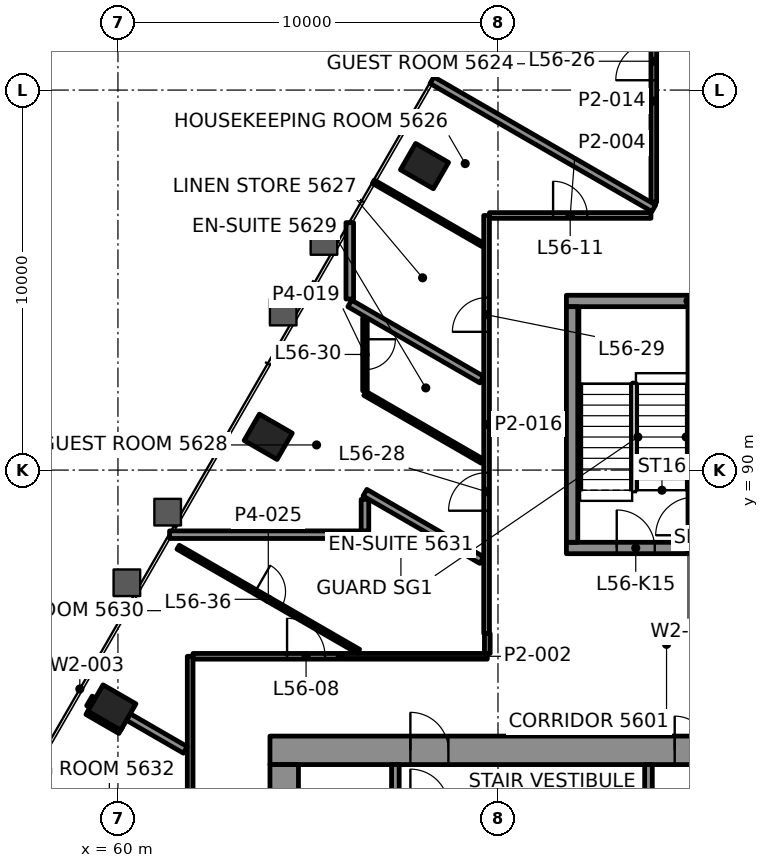
"""IFC4 building model, lengths in metres.
Left out: names, types, materials, properties, quantities, classifications, styles, units other than length and angle.
Written with IfcOpenShell. Run it as: python <this file> out.ifc"""

import sys

from ifc_helpers import new_model, si_unit, direction, frame, frame_2d, origin, origin_2d, place, context, subcontext, project, spatial, rectangle, hollow_rectangle, extrude, element, fill, save


model = new_model("IFC4")
c1 = context("Model", 3, precision=1e-05, world=origin(), true_north=direction((0.0, 1.0)))
c2 = subcontext(c1, "Body", "Model", "MODEL_VIEW")
j1 = project(units=[si_unit("LENGTHUNIT", "METRE"), si_unit("PLANEANGLEUNIT", "RADIAN")], contexts=[c1])
p1 = place(None, origin())
s1 = spatial("IfcSite", under=j1, at=p1, CompositionType="ELEMENT")
p2 = place(p1, origin())
s2 = spatial("IfcBuilding", under=s1, at=p2, CompositionType="ELEMENT")
p3 = place(p2, frame((0.0, 0.0, 237.7)))
s3 = spatial("IfcBuildingStorey", under=s2, at=p3, CompositionType="ELEMENT", Elevation=237.7)
for number, where, z_axis, x_axis in (
    (1, (68.067, 97.999, -0.0), (0.0, 0.0, 1.0), (-0.5, -0.866, 0.0)),
    (2, (63.954, 90.875, -0.0), (0.0, 0.0, 1.0), (-0.5, -0.866, 0.0)),
    (3, (59.841, 83.752, -0.0), (0.0, 0.0, 1.0), (-0.5, -0.866, 0.0)),
):
    element("IfcColumn", number, at=place(p3, frame(where, z_axis=z_axis, x_axis=x_axis)), inside=s3, PredefinedType="COLUMN", context=c2, shape_type="SweptSolid", body=[
        extrude(hollow_rectangle(XDim=0.8, YDim=1.0, WallThickness=0.05, at=origin_2d()), origin(), (0.0, 0.0, 1.0), 3.9),
    ])
p4 = place(p3, frame((64.0, 82.625, 0.0), z_axis=(0.0, 0.0, 1.0), x_axis=(1.0, 0.0, 0.0)))
e4 = element("IfcWall", 4, at=p4, inside=s3, PredefinedType="SHEAR", context=c2, shape_type="SweptSolid", body=[
    extrude(rectangle(XDim=22.0, YDim=0.75, at=frame_2d((11.0, 0.0))), origin(), (0.0, 0.0, 1.0), 3.6),
])
p5 = place(p4, frame((3.695, 0.0, 0.0)))
e5 = element("IfcOpeningElement", 5, at=p5, cuts=e4, PredefinedType="OPENING", context=c2, shape_type="SweptSolid", body=[
    extrude(rectangle(XDim=1.0, YDim=2.1, at=frame_2d((0.5, 1.05))), frame((0.0, 0.385, 0.0), z_axis=(0.0, -1.0, 0.0), x_axis=(1.0, 0.0, 0.0)), (0.0, 0.0, 1.0), 0.77),
])
p6 = place(p4, frame((17.505, 0.0, 0.0)))
e6 = element("IfcOpeningElement", 6, at=p6, cuts=e4, PredefinedType="OPENING", context=c2, shape_type="SweptSolid", body=[
    extrude(rectangle(XDim=1.0, YDim=2.1, at=frame_2d((0.5, 1.05))), frame((0.0, 0.385, 0.0), z_axis=(0.0, -1.0, 0.0), x_axis=(1.0, 0.0, 0.0)), (0.0, 0.0, 1.0), 0.77),
])
p7 = place(p4, frame((10.65, 0.0, 0.0)))
e7 = element("IfcOpeningElement", 7, at=p7, cuts=e4, PredefinedType="OPENING", context=c2, shape_type="SweptSolid", body=[
    extrude(rectangle(XDim=0.9, YDim=2.1, at=frame_2d((0.45, 1.05))), frame((0.0, 0.385, 0.0), z_axis=(0.0, -1.0, 0.0), x_axis=(1.0, 0.0, 0.0)), (0.0, 0.0, 1.0), 0.77),
])
p8 = place(p3, frame((64.375, 67.75, 0.0), z_axis=(0.0, 0.0, 1.0), x_axis=(0.0, 1.0, 0.0)))
e8 = element("IfcWall", 8, at=p8, inside=s3, PredefinedType="SHEAR", context=c2, shape_type="SweptSolid", body=[
    extrude(rectangle(XDim=14.5, YDim=0.75, at=frame_2d((7.25, 0.0))), origin(), (0.0, 0.0, 1.0), 3.6),
])
p9 = place(p8, frame((4.65, 0.0, 0.0)))
e9 = element("IfcOpeningElement", 9, at=p9, cuts=e8, PredefinedType="OPENING", context=c2, shape_type="SweptSolid", body=[
    extrude(rectangle(XDim=1.8, YDim=2.1, at=frame_2d((0.9, 1.05))), frame((0.0, 0.385, 0.0), z_axis=(0.0, -1.0, 0.0), x_axis=(1.0, 0.0, 0.0)), (0.0, 0.0, 1.0), 0.77),
])
p10 = place(p8, frame((2.55, 0.0, 0.0)))
e10 = element("IfcOpeningElement", 10, at=p10, cuts=e8, PredefinedType="OPENING", context=c2, shape_type="SweptSolid", body=[
    extrude(rectangle(XDim=0.9, YDim=2.1, at=frame_2d((0.45, 1.05))), frame((0.0, 0.385, 0.0), z_axis=(0.0, -1.0, 0.0), x_axis=(1.0, 0.0, 0.0)), (0.0, 0.0, 1.0), 0.77),
])
p11 = place(p8, frame((10.35, 0.0, 0.0)))
e11 = element("IfcOpeningElement", 11, at=p11, cuts=e8, PredefinedType="OPENING", context=c2, shape_type="SweptSolid", body=[
    extrude(rectangle(XDim=0.9, YDim=2.1, at=frame_2d((0.45, 1.05))), frame((0.0, 0.385, 0.0), z_axis=(0.0, -1.0, 0.0), x_axis=(1.0, 0.0, 0.0)), (0.0, 0.0, 1.0), 0.77),
])
p12 = place(p3, frame((71.8, 87.95, 0.0), z_axis=(0.0, 0.0, 1.0), x_axis=(1.0, 0.0, 0.0)))
e12 = element("IfcWall", 12, at=p12, inside=s3, PredefinedType="SHEAR", context=c2, shape_type="SweptSolid", body=[
    extrude(rectangle(XDim=6.4, YDim=0.3, at=frame_2d((3.2, 0.0))), origin(), (0.0, 0.0, 1.0), 3.6),
])
p13 = place(p12, frame((1.325, 0.0, 0.0)))
e13 = element("IfcOpeningElement", 13, at=p13, cuts=e12, PredefinedType="OPENING", context=c2, shape_type="SweptSolid", body=[
    extrude(rectangle(XDim=1.0, YDim=2.1, at=frame_2d((0.5, 1.05))), frame((0.0, 0.16, 0.0), z_axis=(0.0, -1.0, 0.0), x_axis=(1.0, 0.0, 0.0)), (0.0, 0.0, 1.0), 0.32),
])
p14 = place(p12, frame((4.125, 0.0, 0.0)))
e14 = element("IfcOpeningElement", 14, at=p14, cuts=e12, PredefinedType="OPENING", context=c2, shape_type="SweptSolid", body=[
    extrude(rectangle(XDim=1.2, YDim=2.1, at=frame_2d((0.6, 1.05))), frame((0.0, 0.16, 0.0), z_axis=(0.0, -1.0, 0.0), x_axis=(1.0, 0.0, 0.0)), (0.0, 0.0, 1.0), 0.32),
])
p15 = place(p3, frame((71.8, 94.45, 0.0), z_axis=(0.0, 0.0, 1.0), x_axis=(1.0, 0.0, 0.0)))
e15 = element("IfcWall", 15, at=p15, inside=s3, PredefinedType="SHEAR", context=c2, shape_type="SweptSolid", body=[
    extrude(rectangle(XDim=6.4, YDim=0.3, at=frame_2d((3.2, 0.0))), origin(), (0.0, 0.0, 1.0), 3.6),
])
p16 = place(p3, frame((71.95, 88.1, 0.0), z_axis=(0.0, 0.0, 1.0), x_axis=(0.0, 1.0, 0.0)))
e16 = element("IfcWall", 16, at=p16, inside=s3, PredefinedType="SHEAR", context=c2, shape_type="SweptSolid", body=[
    extrude(rectangle(XDim=6.2, YDim=0.3, at=frame_2d((3.1, 0.0))), origin(), (0.0, 0.0, 1.0), 3.6),
])
p17 = place(p3, frame((75.15, 88.1, 0.0), z_axis=(0.0, 0.0, 1.0), x_axis=(0.0, 1.0, 0.0)))
e17 = element("IfcWall", 17, at=p17, inside=s3, PredefinedType="SHEAR", context=c2, shape_type="SweptSolid", body=[
    extrude(rectangle(XDim=6.2, YDim=0.3, at=frame_2d((3.1, 0.0))), origin(), (0.0, 0.0, 1.0), 3.6),
])
p18 = place(p17, frame((0.185, 0.0, 0.0)))
e18 = element("IfcOpeningElement", 18, at=p18, cuts=e17, PredefinedType="OPENING", context=c2, shape_type="SweptSolid", body=[
    extrude(rectangle(XDim=1.0, YDim=2.1, at=frame_2d((0.5, 1.05))), frame((0.0, 0.16, 0.0), z_axis=(0.0, -1.0, 0.0), x_axis=(1.0, 0.0, 0.0)), (0.0, 0.0, 1.0), 0.32),
])
p19 = place(p3, frame((61.976, 85.1, 0.0), z_axis=(0.0, 0.0, 1.0), x_axis=(1.0, 0.0, 0.0)))
e19 = element("IfcWall", 19, at=p19, inside=s3, PredefinedType="PARTITIONING", context=c2, shape_type="SweptSolid", body=[
    extrude(rectangle(XDim=7.744, YDim=0.15, at=frame_2d((3.872, 0.0))), origin(), (0.0, 0.0, 1.0), 3.0),
])
p20 = place(p19, frame((2.475, 0.0, 0.0)))
e20 = element("IfcOpeningElement", 20, at=p20, cuts=e19, PredefinedType="OPENING", context=c2, shape_type="SweptSolid", body=[
    extrude(rectangle(XDim=1.0, YDim=2.1, at=frame_2d((0.5, 1.05))), frame((0.0, 0.085, 0.0), z_axis=(0.0, -1.0, 0.0), x_axis=(1.0, 0.0, 0.0)), (0.0, 0.0, 1.0), 0.17),
])
p21 = place(p3, frame((61.358, 88.3, 0.0), z_axis=(0.0, 0.0, 1.0), x_axis=(1.0, 0.0, 0.0)))
e21 = element("IfcWall", 21, at=p21, inside=s3, PredefinedType="PARTITIONING", context=c2, shape_type="SweptSolid", body=[
    extrude(rectangle(XDim=5.141, YDim=0.2, at=frame_2d((2.571, 0.0))), origin(), (0.0, 0.0, 1.0), 2.922),
])
p22 = place(p3, frame((69.775, 96.7, 0.0), z_axis=(0.0, 0.0, 1.0), x_axis=(1.0, 0.0, 0.0)))
e22 = element("IfcWall", 22, at=p22, inside=s3, PredefinedType="PARTITIONING", context=c2, shape_type="SweptSolid", body=[
    extrude(rectangle(XDim=4.25, YDim=0.15, at=frame_2d((2.125, 0.0))), origin(), (0.0, 0.0, 1.0), 3.0),
])
p23 = place(p22, frame((1.675, 0.0, 0.0)))
e23 = element("IfcOpeningElement", 23, at=p23, cuts=e22, PredefinedType="OPENING", context=c2, shape_type="SweptSolid", body=[
    extrude(rectangle(XDim=0.9, YDim=2.1, at=frame_2d((0.45, 1.05))), frame((0.0, 0.085, 0.0), z_axis=(0.0, -1.0, 0.0), x_axis=(1.0, 0.0, 0.0)), (0.0, 0.0, 1.0), 0.17),
])
p24 = place(p3, frame((59.263, 83.751, 0.0), z_axis=(0.0, 0.0, 1.0), x_axis=(0.499941024108, 0.866059450854, 0.0)))
e24 = element("IfcWall", 24, at=p24, inside=s3, PredefinedType="PARTITIONING", context=c2, shape_type="SweptSolid", body=[
    extrude(rectangle(XDim=0.29, YDim=0.2, at=frame_2d((0.145, 0.0))), origin(), (0.0, 0.0, 1.0), 3.0),
])
p25 = place(p3, frame((74.1, 97.05, 0.0), z_axis=(0.0, 0.0, 1.0), x_axis=(0.0, 1.0, 0.0)))
e25 = element("IfcWall", 25, at=p25, inside=s3, PredefinedType="PARTITIONING", context=c2, shape_type="SweptSolid", body=[
    extrude(rectangle(XDim=5.322, YDim=0.15, at=frame_2d((2.661, 0.0))), origin(), (0.0, 0.0, 1.0), 3.0),
])
p26 = place(p25, frame((3.209, 0.0, 0.0)))
e26 = element("IfcOpeningElement", 26, at=p26, cuts=e25, PredefinedType="OPENING", context=c2, shape_type="SweptSolid", body=[
    extrude(rectangle(XDim=1.0, YDim=2.1, at=frame_2d((0.5, 1.05))), frame((0.0, 0.085, 0.0), z_axis=(0.0, -1.0, 0.0), x_axis=(1.0, 0.0, 0.0)), (0.0, 0.0, 1.0), 0.17),
])
p27 = place(p3, frame((69.719, 85.175, 0.0), z_axis=(0.0, 0.0, 1.0), x_axis=(0.0, 1.0, 0.0)))
e27 = element("IfcWall", 27, at=p27, inside=s3, PredefinedType="PARTITIONING", context=c2, shape_type="SweptSolid", body=[
    extrude(rectangle(XDim=0.525, YDim=0.15, at=frame_2d((0.262, 0.0))), origin(), (0.0, 0.0, 1.0), 3.0),
])
p28 = place(p3, frame((69.7, 85.7, 0.0), z_axis=(0.0, 0.0, 1.0), x_axis=(0.0, 1.0, 0.0)))
e28 = element("IfcWall", 28, at=p28, inside=s3, PredefinedType="PARTITIONING", context=c2, shape_type="SweptSolid", body=[
    extrude(rectangle(XDim=10.999, YDim=0.15, at=frame_2d((5.5, 0.0))), origin(), (0.0, 0.0, 1.0), 3.0),
])
p29 = place(p28, frame((3.23, 0.0, 0.0)))
e29 = element("IfcOpeningElement", 29, at=p29, cuts=e28, PredefinedType="OPENING", context=c2, shape_type="SweptSolid", body=[
    extrude(rectangle(XDim=1.0, YDim=2.1, at=frame_2d((0.5, 1.05))), frame((0.0, 0.085, 0.0), z_axis=(0.0, -1.0, 0.0), x_axis=(1.0, 0.0, 0.0)), (0.0, 0.0, 1.0), 0.17),
])
p30 = place(p28, frame((7.938, 0.0, 0.0)))
e30 = element("IfcOpeningElement", 30, at=p30, cuts=e28, PredefinedType="OPENING", context=c2, shape_type="SweptSolid", body=[
    extrude(rectangle(XDim=0.9, YDim=2.1, at=frame_2d((0.45, 1.05))), frame((0.0, 0.085, 0.0), z_axis=(0.0, -1.0, 0.0), x_axis=(1.0, 0.0, 0.0)), (0.0, 0.0, 1.0), 0.17),
])
p31 = place(p3, frame((66.5, 88.4, 0.0), z_axis=(0.0, 0.0, 1.0), x_axis=(0.0, 1.0, 0.0)))
e31 = element("IfcWall", 31, at=p31, inside=s3, PredefinedType="PARTITIONING", context=c2, shape_type="SweptSolid", body=[
    extrude(rectangle(XDim=0.83, YDim=0.2, at=frame_2d((0.415, 0.0))), origin(), (0.0, 0.0, 1.0), 3.0),
])
p32 = place(p3, frame((66.5, 93.999, 0.0), z_axis=(0.0, 0.0, 1.0), x_axis=(0.0, -1.0, 0.0)))
e32 = element("IfcWall", 32, at=p32, inside=s3, PredefinedType="PARTITIONING", context=c2, shape_type="SweptSolid", body=[
    extrude(rectangle(XDim=1.912, YDim=0.12, at=frame_2d((0.956, 0.0))), origin(), (0.0, 0.0, 1.0), 3.0),
])
p33 = place(p32, frame((0.556, 0.0, 0.0)))
e33 = element("IfcOpeningElement", 33, at=p33, cuts=e32, PredefinedType="OPENING", context=c2, shape_type="SweptSolid", body=[
    extrude(rectangle(XDim=0.8, YDim=2.1, at=frame_2d((0.4, 1.05))), frame((0.0, 0.07, 0.0), z_axis=(0.0, -1.0, 0.0), x_axis=(1.0, 0.0, 0.0)), (0.0, 0.0, 1.0), 0.14),
])
p34 = place(p3, frame((66.1, 94.502, 0.0), z_axis=(0.0, 0.0, 1.0), x_axis=(0.0, 1.0, 0.0)))
e34 = element("IfcWall", 34, at=p34, inside=s3, PredefinedType="PARTITIONING", context=c2, shape_type="SweptSolid", body=[
    extrude(rectangle(XDim=2.011, YDim=0.2, at=frame_2d((1.005, 0.0))), origin(), (0.0, 0.0, 1.0), 2.922),
])
p35 = place(p3, frame((61.9, 68.476, 0.0), z_axis=(0.0, 0.0, 1.0), x_axis=(0.0, 1.0, 0.0)))
e35 = element("IfcWall", 35, at=p35, inside=s3, PredefinedType="PARTITIONING", context=c2, shape_type="SweptSolid", body=[
    extrude(rectangle(XDim=16.624, YDim=0.15, at=frame_2d((8.312, 0.0))), origin(), (0.0, 0.0, 1.0), 3.0),
])
p36 = place(p35, frame((1.946, 0.0, 0.0)))
e36 = element("IfcOpeningElement", 36, at=p36, cuts=e35, PredefinedType="OPENING", context=c2, shape_type="SweptSolid", body=[
    extrude(rectangle(XDim=0.9, YDim=2.1, at=frame_2d((0.45, 1.05))), frame((0.0, 0.085, 0.0), z_axis=(0.0, -1.0, 0.0), x_axis=(1.0, 0.0, 0.0)), (0.0, 0.0, 1.0), 0.17),
])
p37 = place(p35, frame((10.263, 0.0, 0.0)))
e37 = element("IfcOpeningElement", 37, at=p37, cuts=e35, PredefinedType="OPENING", context=c2, shape_type="SweptSolid", body=[
    extrude(rectangle(XDim=1.0, YDim=2.1, at=frame_2d((0.5, 1.05))), frame((0.0, 0.085, 0.0), z_axis=(0.0, -1.0, 0.0), x_axis=(1.0, 0.0, 0.0)), (0.0, 0.0, 1.0), 0.17),
])
p38 = place(p3, frame((74.1, 96.89, 0.0), z_axis=(0.0, 0.0, 1.0), x_axis=(-0.866036585879, 0.499980631543, 0.0)))
e38 = element("IfcWall", 38, at=p38, inside=s3, PredefinedType="PARTITIONING", context=c2, shape_type="SweptSolid", body=[
    extrude(rectangle(XDim=6.74, YDim=0.2, at=frame_2d((3.37, 0.0))), origin(), (0.0, 0.0, 1.0), 3.0),
])
p39 = place(p3, frame((69.599, 95.927, 0.0), z_axis=(0.0, 0.0, 1.0), x_axis=(-0.866019199568, 0.500010745865, 0.0)))
e39 = element("IfcWall", 39, at=p39, inside=s3, PredefinedType="PARTITIONING", context=c2, shape_type="SweptSolid", body=[
    extrude(rectangle(XDim=3.323, YDim=0.1, at=frame_2d((1.662, 0.0))), origin(), (0.0, 0.0, 1.0), 2.922),
])
p40 = place(p3, frame((69.573, 92.38, 0.0), z_axis=(0.0, 0.0, 1.0), x_axis=(-0.866020331166, 0.500008785931, 0.0)))
e40 = element("IfcWall", 40, at=p40, inside=s3, PredefinedType="PARTITIONING", context=c2, shape_type="SweptSolid", body=[
    extrude(rectangle(XDim=4.01, YDim=0.2, at=frame_2d((2.005, 0.0))), origin(), (0.0, 0.0, 1.0), 2.922),
])
p41 = place(p3, frame((69.59, 90.233, 0.0), z_axis=(0.0, 0.0, 1.0), x_axis=(-0.866028357664, 0.499994883695, 0.0)))
e41 = element("IfcWall", 41, at=p41, inside=s3, PredefinedType="PARTITIONING", context=c2, shape_type="SweptSolid", body=[
    extrude(rectangle(XDim=3.568, YDim=0.12, at=frame_2d((1.784, 0.0))), origin(), (0.0, 0.0, 1.0), 3.0),
])
p42 = place(p3, frame((69.573, 87.631, 0.0), z_axis=(0.0, 0.0, 1.0), x_axis=(-0.866028616566, 0.499994435258, 0.0)))
e42 = element("IfcWall", 42, at=p42, inside=s3, PredefinedType="PARTITIONING", context=c2, shape_type="SweptSolid", body=[
    extrude(rectangle(XDim=3.548, YDim=0.2, at=frame_2d((1.774, 0.0))), origin(), (0.0, 0.0, 1.0), 3.0),
])
p43 = place(p3, frame((61.583, 87.97, 0.0), z_axis=(0.0, 0.0, 1.0), x_axis=(0.866027562125, -0.499996261625, 0.0)))
e43 = element("IfcWall", 43, at=p43, inside=s3, PredefinedType="PARTITIONING", context=c2, shape_type="SweptSolid", body=[
    extrude(rectangle(XDim=5.48, YDim=0.12, at=frame_2d((2.74, 0.0))), origin(), (0.0, 0.0, 1.0), 2.922),
])
p44 = place(p43, frame((2.34, 0.0, 0.0)))
e44 = element("IfcOpeningElement", 44, at=p44, cuts=e43, PredefinedType="OPENING", context=c2, shape_type="SweptSolid", body=[
    extrude(rectangle(XDim=0.8, YDim=2.1, at=frame_2d((0.4, 1.05))), frame((0.0, 0.07, 0.0), z_axis=(0.0, -1.0, 0.0), x_axis=(1.0, 0.0, 0.0)), (0.0, 0.0, 1.0), 0.14),
])
p45 = place(p3, frame((61.773, 82.637, 0.0), z_axis=(0.0, 0.0, 1.0), x_axis=(-0.866082241464, 0.499901541327, 0.0)))
e45 = element("IfcWall", 45, at=p45, inside=s3, PredefinedType="PARTITIONING", context=c2, shape_type="SweptSolid", body=[
    extrude(rectangle(XDim=1.731, YDim=0.2, at=frame_2d((0.865, 0.0))), origin(), (0.0, 0.0, 1.0), 3.0),
])
p46 = place(p3, frame((60.074, 83.156, 0.0), z_axis=(0.0, 0.0, 1.0), x_axis=(-0.866010750942, 0.50002537861, 0.0)))
e46 = element("IfcWall", 46, at=p46, inside=s3, PredefinedType="PARTITIONING", context=c2, shape_type="SweptSolid", body=[
    extrude(rectangle(XDim=1.0, YDim=0.2, at=frame_2d((0.5, 0.0))), origin(), (0.0, 0.0, 1.0), 2.922),
])
for number, where, z_axis, x_axis in (
    (47, (67.3, 81.28, 0.0), (0.0, 0.0, 1.0), (0.0, 1.0, 0.0)),
    (48, (73.96, 81.28, 0.0), (0.0, 0.0, 1.0), (0.0, 1.0, 0.0)),
):
    element("IfcWall", number, at=place(p3, frame(where, z_axis=z_axis, x_axis=x_axis)), inside=s3, PredefinedType="PARTITIONING", context=c2, shape_type="SweptSolid", body=[
        extrude(rectangle(XDim=0.97, YDim=0.2, at=frame_2d((0.485, 0.0))), origin(), (0.0, 0.0, 1.0), 3.6),
    ])
p47 = place(p20, origin())
e49 = element("IfcDoor", 49, at=p47, inside=s3, OperationType="SINGLE_SWING_LEFT", PredefinedType="DOOR", context=c2, shape_type="SweptSolid", body=[
    extrude(rectangle(XDim=1.0, YDim=2.1, at=frame_2d((0.5, 1.05))), frame((0.0, 0.025, 0.0), z_axis=(0.0, -1.0, 0.0), x_axis=(1.0, 0.0, 0.0)), (0.0, 0.0, 1.0), 0.05),
])
fill(e20, e49)
p48 = place(p23, origin())
e50 = element("IfcDoor", 50, at=p48, inside=s3, OperationType="SINGLE_SWING_LEFT", PredefinedType="DOOR", context=c2, shape_type="SweptSolid", body=[
    extrude(rectangle(XDim=0.9, YDim=2.1, at=frame_2d((0.45, 1.05))), frame((0.0, 0.025, 0.0), z_axis=(0.0, -1.0, 0.0), x_axis=(1.0, 0.0, 0.0)), (0.0, 0.0, 1.0), 0.05),
])
fill(e23, e50)
p49 = place(p26, origin())
e51 = element("IfcDoor", 51, at=p49, inside=s3, OperationType="SINGLE_SWING_LEFT", PredefinedType="DOOR", context=c2, shape_type="SweptSolid", body=[
    extrude(rectangle(XDim=1.0, YDim=2.1, at=frame_2d((0.5, 1.05))), frame((0.0, 0.025, 0.0), z_axis=(0.0, -1.0, 0.0), x_axis=(1.0, 0.0, 0.0)), (0.0, 0.0, 1.0), 0.05),
])
fill(e26, e51)
p50 = place(p29, origin())
e52 = element("IfcDoor", 52, at=p50, inside=s3, OperationType="SINGLE_SWING_LEFT", PredefinedType="DOOR", context=c2, shape_type="SweptSolid", body=[
    extrude(rectangle(XDim=1.0, YDim=2.1, at=frame_2d((0.5, 1.05))), frame((0.0, 0.025, 0.0), z_axis=(0.0, -1.0, 0.0), x_axis=(1.0, 0.0, 0.0)), (0.0, 0.0, 1.0), 0.05),
])
fill(e29, e52)
p51 = place(p30, origin())
e53 = element("IfcDoor", 53, at=p51, inside=s3, OperationType="SINGLE_SWING_RIGHT", PredefinedType="DOOR", context=c2, shape_type="SweptSolid", body=[
    extrude(rectangle(XDim=0.9, YDim=2.1, at=frame_2d((0.45, 1.05))), frame((0.0, 0.025, 0.0), z_axis=(0.0, -1.0, 0.0), x_axis=(1.0, 0.0, 0.0)), (0.0, 0.0, 1.0), 0.05),
])
fill(e30, e53)
p52 = place(p33, origin())
e54 = element("IfcDoor", 54, at=p52, inside=s3, OperationType="SINGLE_SWING_LEFT", PredefinedType="DOOR", context=c2, shape_type="SweptSolid", body=[
    extrude(rectangle(XDim=0.8, YDim=2.1, at=frame_2d((0.4, 1.05))), frame((0.0, 0.025, 0.0), z_axis=(0.0, -1.0, 0.0), x_axis=(1.0, 0.0, 0.0)), (0.0, 0.0, 1.0), 0.05),
])
fill(e33, e54)
p53 = place(p44, origin())
e55 = element("IfcDoor", 55, at=p53, inside=s3, OperationType="SINGLE_SWING_LEFT", PredefinedType="DOOR", context=c2, shape_type="SweptSolid", body=[
    extrude(rectangle(XDim=0.8, YDim=2.1, at=frame_2d((0.4, 1.05))), frame((0.0, 0.025, 0.0), z_axis=(0.0, -1.0, 0.0), x_axis=(1.0, 0.0, 0.0)), (0.0, 0.0, 1.0), 0.05),
])
fill(e44, e55)
p54 = place(p5, origin())
e56 = element("IfcDoor", 56, at=p54, inside=s3, OperationType="SINGLE_SWING_LEFT", PredefinedType="DOOR", context=c2, shape_type="SweptSolid", body=[
    extrude(rectangle(XDim=1.0, YDim=2.1, at=frame_2d((0.5, 1.05))), frame((0.0, 0.095, 0.0), z_axis=(0.0, -1.0, 0.0), x_axis=(1.0, 0.0, 0.0)), (0.0, 0.0, 1.0), 0.19),
])
fill(e5, e56)
p55 = place(p13, origin())
e57 = element("IfcDoor", 57, at=p55, inside=s3, OperationType="SINGLE_SWING_RIGHT", PredefinedType="DOOR", context=c2, shape_type="SweptSolid", body=[
    extrude(rectangle(XDim=1.0, YDim=2.1, at=frame_2d((0.5, 1.05))), frame((0.0, 0.025, 0.0), z_axis=(0.0, -1.0, 0.0), x_axis=(1.0, 0.0, 0.0)), (0.0, 0.0, 1.0), 0.05),
])
fill(e13, e57)
p56 = place(p7, origin())
e58 = element("IfcDoor", 58, at=p56, inside=s3, OperationType="SINGLE_SWING_LEFT", PredefinedType="DOOR", context=c2, shape_type="SweptSolid", body=[
    extrude(rectangle(XDim=0.9, YDim=2.1, at=frame_2d((0.45, 1.05))), frame((0.0, 0.095, 0.0), z_axis=(0.0, -1.0, 0.0), x_axis=(1.0, 0.0, 0.0)), (0.0, 0.0, 1.0), 0.19),
])
fill(e7, e58)
save(model, sys.argv[1])
